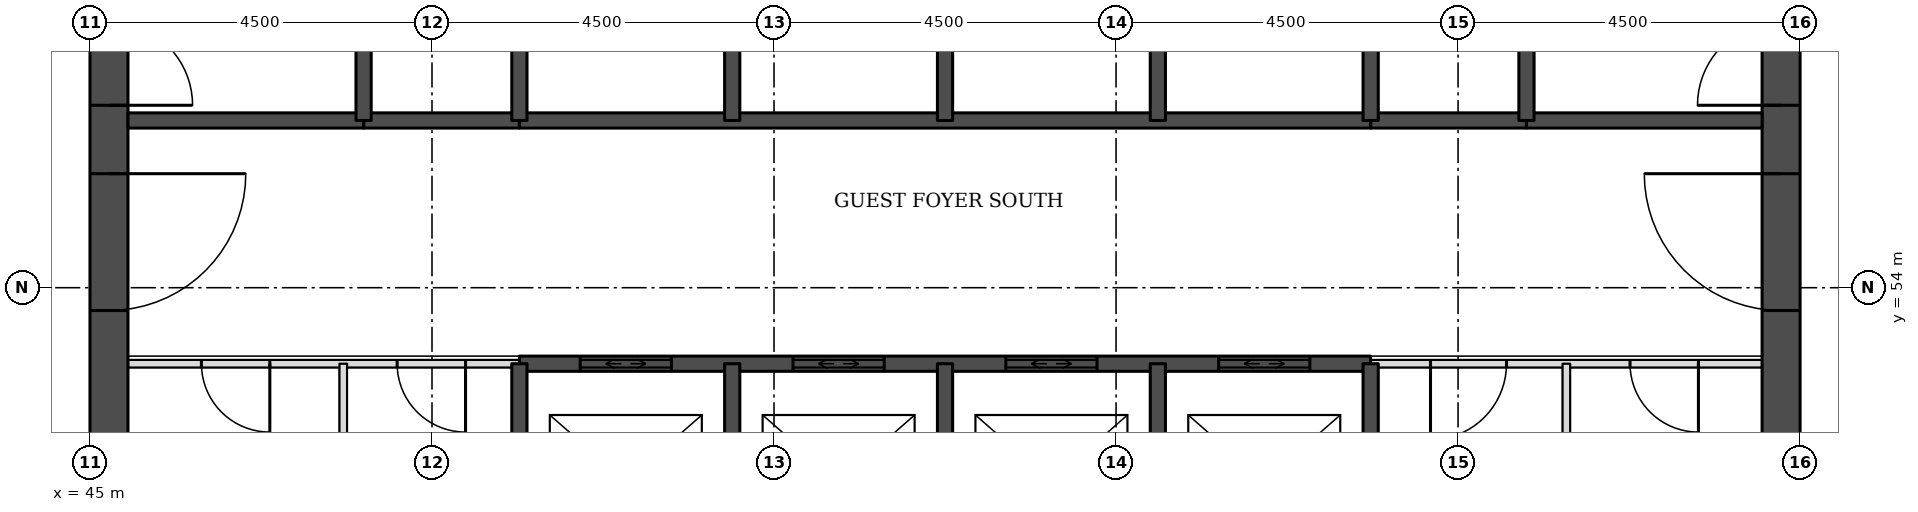
"""IFC4 building model, lengths in metres.
Left out: names, types, materials, properties, quantities, classifications, styles, units other than length and angle.
Written with IfcOpenShell. Run it as: python <this file> out.ifc"""

import sys

from ifc_helpers import new_model, si_unit, direction, frame, frame_2d, origin, place, context, subcontext, project, spatial, rectangle, extrude, element, fill, save


model = new_model("IFC4")
c1 = context("Model", 3, precision=1e-05, world=origin(), true_north=direction((0.0, 1.0)))
c2 = subcontext(c1, "Body", "Model", "MODEL_VIEW")
j1 = project(units=[si_unit("LENGTHUNIT", "METRE"), si_unit("PLANEANGLEUNIT", "RADIAN")], contexts=[c1])
p1 = place(None, origin())
s1 = spatial("IfcSite", under=j1, at=p1, CompositionType="ELEMENT")
p2 = place(p1, origin())
s2 = spatial("IfcBuilding", under=s1, at=p2, CompositionType="ELEMENT")
p3 = place(p2, frame((0.0, 0.0, 49.5)))
s3 = spatial("IfcBuildingStorey", under=s2, at=p3, CompositionType="ELEMENT", Elevation=49.5)
p4 = place(p3, frame((45.25, 49.5, 0.0), z_axis=(0.0, 0.0, 1.0), x_axis=(0.0, 1.0, 0.0)))
e1 = element("IfcWall", 1, at=p4, inside=s3, PredefinedType="SHEAR", context=c2, shape_type="SweptSolid", body=[
    extrude(rectangle(XDim=22.5, YDim=0.5, at=frame_2d((11.25, 0.0))), origin(), (0.0, 0.0, 1.0), 3.3),
])
p5 = place(p4, frame((4.2, 0.0, 0.0)))
e2 = element("IfcOpeningElement", 2, at=p5, cuts=e1, PredefinedType="OPENING", context=c2, shape_type="SweptSolid", body=[
    extrude(rectangle(XDim=1.8, YDim=2.1, at=frame_2d((0.9, 1.05))), frame((0.0, 0.26, 0.0), z_axis=(0.0, -1.0, 0.0), x_axis=(1.0, 0.0, 0.0)), (0.0, 0.0, 1.0), 0.52),
])
p6 = place(p4, frame((6.9, 0.0, 0.0)))
e3 = element("IfcOpeningElement", 3, at=p6, cuts=e1, PredefinedType="OPENING", context=c2, shape_type="SweptSolid", body=[
    extrude(rectangle(XDim=1.1, YDim=2.1, at=frame_2d((0.55, 1.05))), frame((0.0, 0.26, 0.0), z_axis=(0.0, -1.0, 0.0), x_axis=(1.0, 0.0, 0.0)), (0.0, 0.0, 1.0), 0.52),
])
p7 = place(p4, frame((13.6, 0.0, 0.0)))
e4 = element("IfcOpeningElement", 4, at=p7, cuts=e1, PredefinedType="OPENING", context=c2, shape_type="SweptSolid", body=[
    extrude(rectangle(XDim=1.1, YDim=2.1, at=frame_2d((0.55, 1.05))), frame((0.0, 0.26, 0.0), z_axis=(0.0, -1.0, 0.0), x_axis=(1.0, 0.0, 0.0)), (0.0, 0.0, 1.0), 0.52),
])
p8 = place(p4, frame((16.5, 0.0, 0.0)))
e5 = element("IfcOpeningElement", 5, at=p8, cuts=e1, PredefinedType="OPENING", context=c2, shape_type="SweptSolid", body=[
    extrude(rectangle(XDim=1.8, YDim=2.1, at=frame_2d((0.9, 1.05))), frame((0.0, 0.26, 0.0), z_axis=(0.0, -1.0, 0.0), x_axis=(1.0, 0.0, 0.0)), (0.0, 0.0, 1.0), 0.52),
])
p9 = place(p3, frame((67.25, 49.5, 0.0), z_axis=(0.0, 0.0, 1.0), x_axis=(0.0, 1.0, 0.0)))
e6 = element("IfcWall", 6, at=p9, inside=s3, PredefinedType="SHEAR", context=c2, shape_type="SweptSolid", body=[
    extrude(rectangle(XDim=22.5, YDim=0.5, at=frame_2d((11.25, 0.0))), origin(), (0.0, 0.0, 1.0), 3.3),
])
p10 = place(p9, frame((4.2, 0.0, 0.0)))
e7 = element("IfcOpeningElement", 7, at=p10, cuts=e6, PredefinedType="OPENING", context=c2, shape_type="SweptSolid", body=[
    extrude(rectangle(XDim=1.8, YDim=2.1, at=frame_2d((0.9, 1.05))), frame((0.0, 0.26, 0.0), z_axis=(0.0, -1.0, 0.0), x_axis=(1.0, 0.0, 0.0)), (0.0, 0.0, 1.0), 0.52),
])
p11 = place(p9, frame((6.9, 0.0, 0.0)))
e8 = element("IfcOpeningElement", 8, at=p11, cuts=e6, PredefinedType="OPENING", context=c2, shape_type="SweptSolid", body=[
    extrude(rectangle(XDim=1.1, YDim=2.1, at=frame_2d((0.55, 1.05))), frame((0.0, 0.26, 0.0), z_axis=(0.0, -1.0, 0.0), x_axis=(1.0, 0.0, 0.0)), (0.0, 0.0, 1.0), 0.52),
])
p12 = place(p9, frame((13.6, 0.0, 0.0)))
e9 = element("IfcOpeningElement", 9, at=p12, cuts=e6, PredefinedType="OPENING", context=c2, shape_type="SweptSolid", body=[
    extrude(rectangle(XDim=1.1, YDim=2.1, at=frame_2d((0.55, 1.05))), frame((0.0, 0.26, 0.0), z_axis=(0.0, -1.0, 0.0), x_axis=(1.0, 0.0, 0.0)), (0.0, 0.0, 1.0), 0.52),
])
p13 = place(p9, frame((16.5, 0.0, 0.0)))
e10 = element("IfcOpeningElement", 10, at=p13, cuts=e6, PredefinedType="OPENING", context=c2, shape_type="SweptSolid", body=[
    extrude(rectangle(XDim=1.8, YDim=2.1, at=frame_2d((0.9, 1.05))), frame((0.0, 0.26, 0.0), z_axis=(0.0, -1.0, 0.0), x_axis=(1.0, 0.0, 0.0)), (0.0, 0.0, 1.0), 0.52),
])
p14 = place(p3, frame((45.5, 53.0, 0.0), z_axis=(0.0, 0.0, 1.0), x_axis=(1.0, 0.0, 0.0)))
e11 = element("IfcWall", 11, at=p14, inside=s3, PredefinedType="PARTITIONING", context=c2, shape_type="SweptSolid", body=[
    extrude(rectangle(XDim=5.15, YDim=0.1, at=frame_2d((2.575, 0.0))), origin(), (0.0, 0.0, 1.0), 3.08),
])
p15 = place(p14, frame((0.966, 0.0, 0.0)))
e12 = element("IfcOpeningElement", 12, at=p15, cuts=e11, PredefinedType="OPENING", context=c2, shape_type="SweptSolid", body=[
    extrude(rectangle(XDim=0.9, YDim=2.1, at=frame_2d((0.45, 1.05))), frame((0.0, 0.06, 0.0), z_axis=(0.0, -1.0, 0.0), x_axis=(1.0, 0.0, 0.0)), (0.0, 0.0, 1.0), 0.12),
])
p16 = place(p14, frame((3.541, 0.0, 0.0)))
e13 = element("IfcOpeningElement", 13, at=p16, cuts=e11, PredefinedType="OPENING", context=c2, shape_type="SweptSolid", body=[
    extrude(rectangle(XDim=0.9, YDim=2.1, at=frame_2d((0.45, 1.05))), frame((0.0, 0.06, 0.0), z_axis=(0.0, -1.0, 0.0), x_axis=(1.0, 0.0, 0.0)), (0.0, 0.0, 1.0), 0.12),
])
p17 = place(p3, frame((61.85, 53.0, 0.0), z_axis=(0.0, 0.0, 1.0), x_axis=(1.0, 0.0, 0.0)))
e14 = element("IfcWall", 14, at=p17, inside=s3, PredefinedType="PARTITIONING", context=c2, shape_type="SweptSolid", body=[
    extrude(rectangle(XDim=5.15, YDim=0.1, at=frame_2d((2.575, 0.0))), origin(), (0.0, 0.0, 1.0), 3.08),
])
p18 = place(p17, frame((3.413, 0.0, 0.0)))
e15 = element("IfcOpeningElement", 15, at=p18, cuts=e14, PredefinedType="OPENING", context=c2, shape_type="SweptSolid", body=[
    extrude(rectangle(XDim=0.9, YDim=2.1, at=frame_2d((0.45, 1.05))), frame((0.0, 0.06, 0.0), z_axis=(0.0, -1.0, 0.0), x_axis=(1.0, 0.0, 0.0)), (0.0, 0.0, 1.0), 0.12),
])
p19 = place(p17, frame((0.788, 0.0, 0.0)))
e16 = element("IfcOpeningElement", 16, at=p19, cuts=e14, PredefinedType="OPENING", context=c2, shape_type="SweptSolid", body=[
    extrude(rectangle(XDim=1.0, YDim=2.1, at=frame_2d((0.5, 1.05))), frame((0.0, 0.06, 0.0), z_axis=(0.0, -1.0, 0.0), x_axis=(1.0, 0.0, 0.0)), (0.0, 0.0, 1.0), 0.12),
])
p20 = place(p3, frame((50.65, 53.0, 0.0), z_axis=(0.0, 0.0, 1.0), x_axis=(1.0, 0.0, 0.0)))
e17 = element("IfcWall", 17, at=p20, inside=s3, PredefinedType="SOLIDWALL", context=c2, shape_type="SweptSolid", body=[
    extrude(rectangle(XDim=11.2, YDim=0.2, at=frame_2d((5.6, 0.0))), origin(), (0.0, 0.0, 1.0), 3.08),
])
p21 = place(p20, frame((0.8, 0.0, 0.0)))
e18 = element("IfcOpeningElement", 18, at=p21, cuts=e17, PredefinedType="OPENING", context=c2, shape_type="SweptSolid", body=[
    extrude(rectangle(XDim=1.2, YDim=2.1, at=frame_2d((0.6, 1.05))), frame((0.0, 0.11, 0.0), z_axis=(0.0, -1.0, 0.0), x_axis=(1.0, 0.0, 0.0)), (0.0, 0.0, 1.0), 0.22),
])
p22 = place(p20, frame((3.6, 0.0, 0.0)))
e19 = element("IfcOpeningElement", 19, at=p22, cuts=e17, PredefinedType="OPENING", context=c2, shape_type="SweptSolid", body=[
    extrude(rectangle(XDim=1.2, YDim=2.1, at=frame_2d((0.6, 1.05))), frame((0.0, 0.11, 0.0), z_axis=(0.0, -1.0, 0.0), x_axis=(1.0, 0.0, 0.0)), (0.0, 0.0, 1.0), 0.22),
])
p23 = place(p20, frame((6.4, 0.0, 0.0)))
e20 = element("IfcOpeningElement", 20, at=p23, cuts=e17, PredefinedType="OPENING", context=c2, shape_type="SweptSolid", body=[
    extrude(rectangle(XDim=1.2, YDim=2.1, at=frame_2d((0.6, 1.05))), frame((0.0, 0.11, 0.0), z_axis=(0.0, -1.0, 0.0), x_axis=(1.0, 0.0, 0.0)), (0.0, 0.0, 1.0), 0.22),
])
p24 = place(p20, frame((9.2, 0.0, 0.0)))
e21 = element("IfcOpeningElement", 21, at=p24, cuts=e17, PredefinedType="OPENING", context=c2, shape_type="SweptSolid", body=[
    extrude(rectangle(XDim=1.2, YDim=2.1, at=frame_2d((0.6, 1.05))), frame((0.0, 0.11, 0.0), z_axis=(0.0, -1.0, 0.0), x_axis=(1.0, 0.0, 0.0)), (0.0, 0.0, 1.0), 0.22),
])
for number, where, z_axis, x_axis in (
    (22, (48.6, 56.2, 0.0), (0.0, 0.0, 1.0), (1.0, 0.0, 0.0)),
    (23, (61.85, 56.2, 0.0), (0.0, 0.0, 1.0), (1.0, 0.0, 0.0)),
):
    element("IfcWall", number, at=place(p3, frame(where, z_axis=z_axis, x_axis=x_axis)), inside=s3, PredefinedType="SOLIDWALL", context=c2, shape_type="SweptSolid", body=[
        extrude(rectangle(XDim=2.05, YDim=0.2, at=frame_2d((1.025, 0.0))), origin(), (0.0, 0.0, 1.0), 3.08),
    ])
p25 = place(p3, frame((45.5, 56.2, 0.0), z_axis=(0.0, 0.0, 1.0), x_axis=(1.0, 0.0, 0.0)))
e24 = element("IfcWall", 24, at=p25, inside=s3, PredefinedType="SOLIDWALL", context=c2, shape_type="SweptSolid", body=[
    extrude(rectangle(XDim=3.1, YDim=0.2, at=frame_2d((1.55, 0.0))), origin(), (0.0, 0.0, 1.0), 3.08),
])
p26 = place(p3, frame((50.65, 56.2, 0.0), z_axis=(0.0, 0.0, 1.0), x_axis=(1.0, 0.0, 0.0)))
e25 = element("IfcWall", 25, at=p26, inside=s3, PredefinedType="SOLIDWALL", context=c2, shape_type="SweptSolid", body=[
    extrude(rectangle(XDim=11.2, YDim=0.2, at=frame_2d((5.6, 0.0))), origin(), (0.0, 0.0, 1.0), 3.08),
])
p27 = place(p3, frame((63.9, 56.2, 0.0), z_axis=(0.0, 0.0, 1.0), x_axis=(1.0, 0.0, 0.0)))
e26 = element("IfcWall", 26, at=p27, inside=s3, PredefinedType="SOLIDWALL", context=c2, shape_type="SweptSolid", body=[
    extrude(rectangle(XDim=3.1, YDim=0.2, at=frame_2d((1.55, 0.0))), origin(), (0.0, 0.0, 1.0), 3.08),
])
p28 = place(p3, frame((48.333, 50.0, 0.0), z_axis=(0.0, 0.0, 1.0), x_axis=(0.0, 1.0, 0.0)))
e27 = element("IfcWall", 27, at=p28, inside=s3, PredefinedType="PARTITIONING", context=c2, shape_type="SweptSolid", body=[
    extrude(rectangle(XDim=3.0, YDim=0.1, at=frame_2d((1.5, 0.0))), origin(), (0.0, 0.0, 1.0), 3.08),
])
p29 = place(p3, frame((48.6, 56.2, 0.0), z_axis=(0.0, 0.0, 1.0), x_axis=(0.0, 1.0, 0.0)))
e28 = element("IfcWall", 28, at=p29, inside=s3, PredefinedType="SOLIDWALL", context=c2, shape_type="SweptSolid", body=[
    extrude(rectangle(XDim=5.8, YDim=0.2, at=frame_2d((2.9, 0.0))), origin(), (0.0, 0.0, 1.0), 3.08),
])
p30 = place(p3, frame((50.65, 50.0, 0.0), z_axis=(0.0, 0.0, 1.0), x_axis=(0.0, 1.0, 0.0)))
e29 = element("IfcWall", 29, at=p30, inside=s3, PredefinedType="SOLIDWALL", context=c2, shape_type="SweptSolid", body=[
    extrude(rectangle(XDim=3.0, YDim=0.2, at=frame_2d((1.5, 0.0))), origin(), (0.0, 0.0, 1.0), 3.08),
])
p31 = place(p3, frame((50.65, 56.2, 0.0), z_axis=(0.0, 0.0, 1.0), x_axis=(0.0, 1.0, 0.0)))
e30 = element("IfcWall", 30, at=p31, inside=s3, PredefinedType="SOLIDWALL", context=c2, shape_type="SweptSolid", body=[
    extrude(rectangle(XDim=2.8, YDim=0.2, at=frame_2d((1.4, 0.0))), origin(), (0.0, 0.0, 1.0), 3.08),
])
p32 = place(p3, frame((53.45, 50.0, 0.0), z_axis=(0.0, 0.0, 1.0), x_axis=(0.0, 1.0, 0.0)))
e31 = element("IfcWall", 31, at=p32, inside=s3, PredefinedType="SOLIDWALL", context=c2, shape_type="SweptSolid", body=[
    extrude(rectangle(XDim=3.0, YDim=0.2, at=frame_2d((1.5, 0.0))), origin(), (0.0, 0.0, 1.0), 3.08),
])
p33 = place(p3, frame((53.45, 56.2, 0.0), z_axis=(0.0, 0.0, 1.0), x_axis=(0.0, 1.0, 0.0)))
e32 = element("IfcWall", 32, at=p33, inside=s3, PredefinedType="SOLIDWALL", context=c2, shape_type="SweptSolid", body=[
    extrude(rectangle(XDim=2.8, YDim=0.2, at=frame_2d((1.4, 0.0))), origin(), (0.0, 0.0, 1.0), 3.08),
])
p34 = place(p3, frame((56.25, 50.0, 0.0), z_axis=(0.0, 0.0, 1.0), x_axis=(0.0, 1.0, 0.0)))
e33 = element("IfcWall", 33, at=p34, inside=s3, PredefinedType="SOLIDWALL", context=c2, shape_type="SweptSolid", body=[
    extrude(rectangle(XDim=3.0, YDim=0.2, at=frame_2d((1.5, 0.0))), origin(), (0.0, 0.0, 1.0), 3.08),
])
p35 = place(p3, frame((56.25, 56.2, 0.0), z_axis=(0.0, 0.0, 1.0), x_axis=(0.0, 1.0, 0.0)))
e34 = element("IfcWall", 34, at=p35, inside=s3, PredefinedType="SOLIDWALL", context=c2, shape_type="SweptSolid", body=[
    extrude(rectangle(XDim=2.8, YDim=0.2, at=frame_2d((1.4, 0.0))), origin(), (0.0, 0.0, 1.0), 3.08),
])
p36 = place(p3, frame((59.05, 50.0, 0.0), z_axis=(0.0, 0.0, 1.0), x_axis=(0.0, 1.0, 0.0)))
e35 = element("IfcWall", 35, at=p36, inside=s3, PredefinedType="SOLIDWALL", context=c2, shape_type="SweptSolid", body=[
    extrude(rectangle(XDim=3.0, YDim=0.2, at=frame_2d((1.5, 0.0))), origin(), (0.0, 0.0, 1.0), 3.08),
])
p37 = place(p3, frame((59.05, 56.2, 0.0), z_axis=(0.0, 0.0, 1.0), x_axis=(0.0, 1.0, 0.0)))
e36 = element("IfcWall", 36, at=p37, inside=s3, PredefinedType="SOLIDWALL", context=c2, shape_type="SweptSolid", body=[
    extrude(rectangle(XDim=2.8, YDim=0.2, at=frame_2d((1.4, 0.0))), origin(), (0.0, 0.0, 1.0), 3.08),
])
p38 = place(p3, frame((61.85, 50.0, 0.0), z_axis=(0.0, 0.0, 1.0), x_axis=(0.0, 1.0, 0.0)))
e37 = element("IfcWall", 37, at=p38, inside=s3, PredefinedType="SOLIDWALL", context=c2, shape_type="SweptSolid", body=[
    extrude(rectangle(XDim=3.0, YDim=0.2, at=frame_2d((1.5, 0.0))), origin(), (0.0, 0.0, 1.0), 3.08),
])
p39 = place(p3, frame((61.85, 56.2, 0.0), z_axis=(0.0, 0.0, 1.0), x_axis=(0.0, 1.0, 0.0)))
e38 = element("IfcWall", 38, at=p39, inside=s3, PredefinedType="SOLIDWALL", context=c2, shape_type="SweptSolid", body=[
    extrude(rectangle(XDim=2.8, YDim=0.2, at=frame_2d((1.4, 0.0))), origin(), (0.0, 0.0, 1.0), 3.08),
])
p40 = place(p3, frame((63.9, 56.2, 0.0), z_axis=(0.0, 0.0, 1.0), x_axis=(0.0, 1.0, 0.0)))
e39 = element("IfcWall", 39, at=p40, inside=s3, PredefinedType="SOLIDWALL", context=c2, shape_type="SweptSolid", body=[
    extrude(rectangle(XDim=5.8, YDim=0.2, at=frame_2d((2.9, 0.0))), origin(), (0.0, 0.0, 1.0), 3.08),
])
p41 = place(p3, frame((64.425, 50.0, 0.0), z_axis=(0.0, 0.0, 1.0), x_axis=(0.0, 1.0, 0.0)))
e40 = element("IfcWall", 40, at=p41, inside=s3, PredefinedType="PARTITIONING", context=c2, shape_type="SweptSolid", body=[
    extrude(rectangle(XDim=3.0, YDim=0.1, at=frame_2d((1.5, 0.0))), origin(), (0.0, 0.0, 1.0), 3.08),
])
p42 = place(p21, origin())
e41 = element("IfcDoor", 41, at=p42, inside=s3, OperationType="DOUBLE_DOOR_SLIDING", PredefinedType="DOOR", context=c2, shape_type="SweptSolid", body=[
    extrude(rectangle(XDim=1.2, YDim=2.1, at=frame_2d((0.6, 1.05))), frame((0.0, 0.025, 0.0), z_axis=(0.0, -1.0, 0.0), x_axis=(1.0, 0.0, 0.0)), (0.0, 0.0, 1.0), 0.05),
])
fill(e18, e41)
p43 = place(p22, origin())
e42 = element("IfcDoor", 42, at=p43, inside=s3, OperationType="DOUBLE_DOOR_SLIDING", PredefinedType="DOOR", context=c2, shape_type="SweptSolid", body=[
    extrude(rectangle(XDim=1.2, YDim=2.1, at=frame_2d((0.6, 1.05))), frame((0.0, 0.025, 0.0), z_axis=(0.0, -1.0, 0.0), x_axis=(1.0, 0.0, 0.0)), (0.0, 0.0, 1.0), 0.05),
])
fill(e19, e42)
p44 = place(p23, origin())
e43 = element("IfcDoor", 43, at=p44, inside=s3, OperationType="DOUBLE_DOOR_SLIDING", PredefinedType="DOOR", context=c2, shape_type="SweptSolid", body=[
    extrude(rectangle(XDim=1.2, YDim=2.1, at=frame_2d((0.6, 1.05))), frame((0.0, 0.025, 0.0), z_axis=(0.0, -1.0, 0.0), x_axis=(1.0, 0.0, 0.0)), (0.0, 0.0, 1.0), 0.05),
])
fill(e20, e43)
p45 = place(p24, origin())
e44 = element("IfcDoor", 44, at=p45, inside=s3, OperationType="DOUBLE_DOOR_SLIDING", PredefinedType="DOOR", context=c2, shape_type="SweptSolid", body=[
    extrude(rectangle(XDim=1.2, YDim=2.1, at=frame_2d((0.6, 1.05))), frame((0.0, 0.025, 0.0), z_axis=(0.0, -1.0, 0.0), x_axis=(1.0, 0.0, 0.0)), (0.0, 0.0, 1.0), 0.05),
])
fill(e21, e44)
p46 = place(p5, frame((1.8, 0.0, 0.0), z_axis=(0.0, 0.0, 1.0), x_axis=(-1.0, 0.0, 0.0)))
e45 = element("IfcDoor", 45, at=p46, inside=s3, OperationType="SINGLE_SWING_LEFT", PredefinedType="DOOR", context=c2, shape_type="SweptSolid", body=[
    extrude(rectangle(XDim=1.8, YDim=2.1, at=frame_2d((0.9, 1.05))), frame((0.0, 0.025, 0.0), z_axis=(0.0, -1.0, 0.0), x_axis=(1.0, 0.0, 0.0)), (0.0, 0.0, 1.0), 0.05),
])
fill(e2, e45)
p47 = place(p6, frame((1.1, 0.0, 0.0), z_axis=(0.0, 0.0, 1.0), x_axis=(-1.0, 0.0, 0.0)))
e46 = element("IfcDoor", 46, at=p47, inside=s3, OperationType="SINGLE_SWING_RIGHT", PredefinedType="DOOR", context=c2, shape_type="SweptSolid", body=[
    extrude(rectangle(XDim=1.1, YDim=2.1, at=frame_2d((0.55, 1.05))), frame((0.0, 0.025, 0.0), z_axis=(0.0, -1.0, 0.0), x_axis=(1.0, 0.0, 0.0)), (0.0, 0.0, 1.0), 0.05),
])
fill(e3, e46)
p48 = place(p10, origin())
e47 = element("IfcDoor", 47, at=p48, inside=s3, OperationType="SINGLE_SWING_RIGHT", PredefinedType="DOOR", context=c2, shape_type="SweptSolid", body=[
    extrude(rectangle(XDim=1.8, YDim=2.1, at=frame_2d((0.9, 1.05))), frame((0.0, 0.025, 0.0), z_axis=(0.0, -1.0, 0.0), x_axis=(1.0, 0.0, 0.0)), (0.0, 0.0, 1.0), 0.05),
])
fill(e7, e47)
p49 = place(p11, origin())
e48 = element("IfcDoor", 48, at=p49, inside=s3, OperationType="SINGLE_SWING_LEFT", PredefinedType="DOOR", context=c2, shape_type="SweptSolid", body=[
    extrude(rectangle(XDim=1.1, YDim=2.1, at=frame_2d((0.55, 1.05))), frame((0.0, 0.025, 0.0), z_axis=(0.0, -1.0, 0.0), x_axis=(1.0, 0.0, 0.0)), (0.0, 0.0, 1.0), 0.05),
])
fill(e8, e48)
p50 = place(p18, frame((0.9, 0.0, 0.0), z_axis=(0.0, 0.0, 1.0), x_axis=(-1.0, 0.0, 0.0)))
e49 = element("IfcDoor", 49, at=p50, inside=s3, OperationType="SINGLE_SWING_LEFT", PredefinedType="DOOR", context=c2, shape_type="SweptSolid", body=[
    extrude(rectangle(XDim=0.9, YDim=2.1, at=frame_2d((0.45, 1.05))), frame((0.0, 0.025, 0.0), z_axis=(0.0, -1.0, 0.0), x_axis=(1.0, 0.0, 0.0)), (0.0, 0.0, 1.0), 0.05),
])
fill(e15, e49)
p51 = place(p19, frame((1.0, 0.0, 0.0), z_axis=(0.0, 0.0, 1.0), x_axis=(-1.0, 0.0, 0.0)))
e50 = element("IfcDoor", 50, at=p51, inside=s3, OperationType="SINGLE_SWING_RIGHT", PredefinedType="DOOR", context=c2, shape_type="SweptSolid", body=[
    extrude(rectangle(XDim=1.0, YDim=2.1, at=frame_2d((0.5, 1.05))), frame((0.0, 0.025, 0.0), z_axis=(0.0, -1.0, 0.0), x_axis=(1.0, 0.0, 0.0)), (0.0, 0.0, 1.0), 0.05),
])
fill(e16, e50)
p52 = place(p15, frame((0.9, 0.0, 0.0), z_axis=(0.0, 0.0, 1.0), x_axis=(-1.0, 0.0, 0.0)))
e51 = element("IfcDoor", 51, at=p52, inside=s3, OperationType="SINGLE_SWING_LEFT", PredefinedType="DOOR", context=c2, shape_type="SweptSolid", body=[
    extrude(rectangle(XDim=0.9, YDim=2.1, at=frame_2d((0.45, 1.05))), frame((0.0, 0.025, 0.0), z_axis=(0.0, -1.0, 0.0), x_axis=(1.0, 0.0, 0.0)), (0.0, 0.0, 1.0), 0.05),
])
fill(e12, e51)
p53 = place(p16, frame((0.9, 0.0, 0.0), z_axis=(0.0, 0.0, 1.0), x_axis=(-1.0, 0.0, 0.0)))
e52 = element("IfcDoor", 52, at=p53, inside=s3, OperationType="SINGLE_SWING_LEFT", PredefinedType="DOOR", context=c2, shape_type="SweptSolid", body=[
    extrude(rectangle(XDim=0.9, YDim=2.1, at=frame_2d((0.45, 1.05))), frame((0.0, 0.025, 0.0), z_axis=(0.0, -1.0, 0.0), x_axis=(1.0, 0.0, 0.0)), (0.0, 0.0, 1.0), 0.05),
])
fill(e13, e52)
save(model, sys.argv[1])
